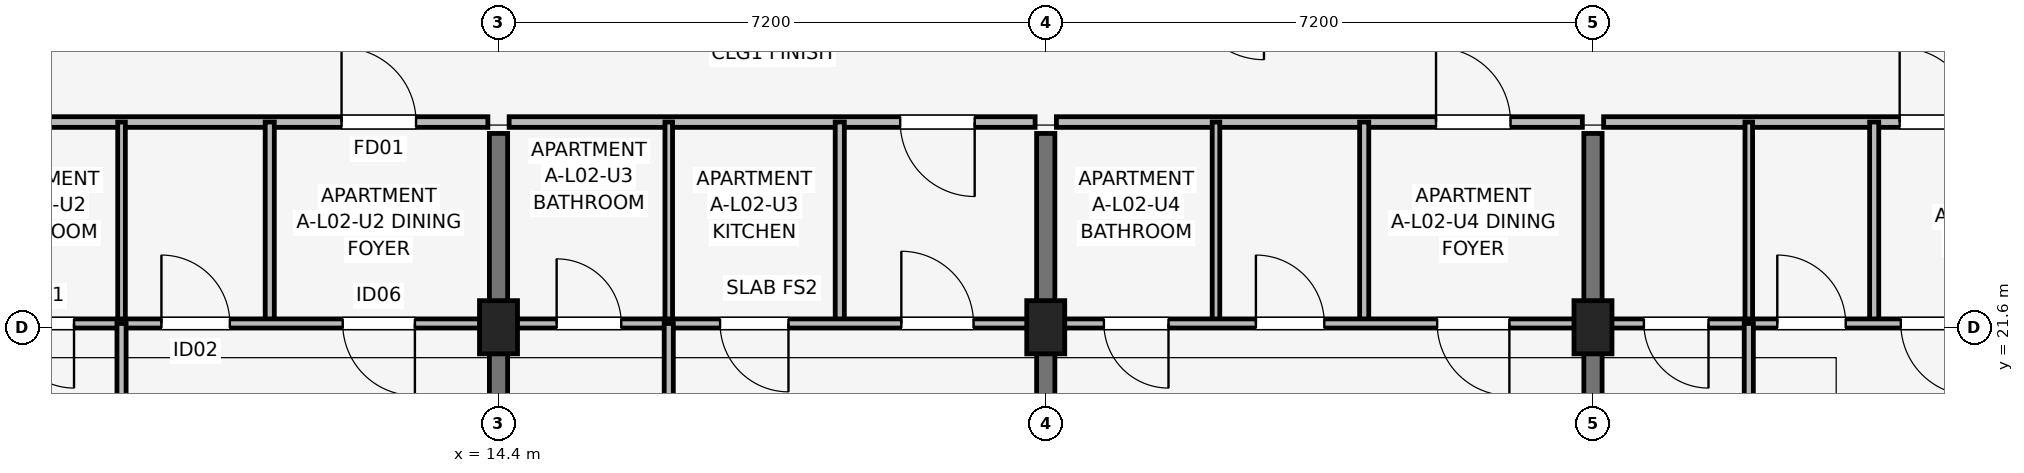
"""IFC4 building model, lengths in metres.
Left out: names, types, materials, properties, quantities, classifications, styles, units other than length and angle.
Written with IfcOpenShell. Run it as: python <this file> out.ifc"""

import sys

from ifc_helpers import new_model, si_unit, direction, frame, frame_2d, origin, origin_2d, place, context, subcontext, project, spatial, rectangle, extrude, element, fill, save


model = new_model("IFC4")
c1 = context("Model", 3, precision=1e-05, world=origin(), true_north=direction((0.0, 1.0)))
c2 = subcontext(c1, "Body", "Model", "MODEL_VIEW")
j1 = project(units=[si_unit("LENGTHUNIT", "METRE"), si_unit("PLANEANGLEUNIT", "RADIAN")], contexts=[c1])
p1 = place(None, origin())
s1 = spatial("IfcSite", under=j1, at=p1, CompositionType="ELEMENT")
p2 = place(p1, origin())
s2 = spatial("IfcBuilding", under=s1, at=p2, CompositionType="ELEMENT")
p3 = place(p2, frame((0.0, 0.0, 8.7)))
s3 = spatial("IfcBuildingStorey", under=s2, at=p3, CompositionType="ELEMENT", Elevation=8.7)
for number, where, z_axis, x_axis in (
    (1, (14.4, 21.6, 0.0), (0.0, 0.0, 1.0), (1.0, 0.0, 0.0)),
    (2, (21.6, 21.6, 0.0), (0.0, 0.0, 1.0), (1.0, 0.0, 0.0)),
    (3, (28.8, 21.6, 0.0), (0.0, 0.0, 1.0), (1.0, 0.0, 0.0)),
):
    element("IfcColumn", number, at=place(p3, frame(where, z_axis=z_axis, x_axis=x_axis)), inside=s3, PredefinedType="COLUMN", context=c2, shape_type="SweptSolid", body=[
        extrude(rectangle(XDim=0.5, YDim=0.7, at=origin_2d()), origin(), (0.0, 0.0, 1.0), 3.15),
    ])
for number, where, z_axis, x_axis in (
    (4, (14.4, 14.75, 0.0), (0.0, 0.0, 1.0), (0.0, 1.0, 0.0)),
    (5, (21.6, 14.75, 0.0), (0.0, 0.0, 1.0), (0.0, 1.0, 0.0)),
    (6, (28.8, 14.75, 0.0), (0.0, 0.0, 1.0), (0.0, 1.0, 0.0)),
):
    element("IfcWall", number, at=place(p3, frame(where, z_axis=z_axis, x_axis=x_axis)), inside=s3, PredefinedType="SHEAR", context=c2, shape_type="SweptSolid", body=[
        extrude(rectangle(XDim=9.4, YDim=0.24, at=frame_2d((4.7, 0.0))), origin(), (0.0, 0.0, 1.0), 3.15),
    ])
p4 = place(p3, frame((7.34, 24.3, 0.0), z_axis=(0.0, 0.0, 1.0), x_axis=(1.0, 0.0, 0.0)))
e7 = element("IfcWall", 7, at=p4, inside=s3, PredefinedType="PARTITIONING", context=c2, shape_type="SweptSolid", body=[
    extrude(rectangle(XDim=6.92, YDim=0.14, at=frame_2d((3.46, 0.0))), origin(), (0.0, 0.0, 1.0), 2.38),
])
p5 = place(p4, frame((4.995, 0.0, 0.0)))
e8 = element("IfcOpeningElement", 8, at=p5, cuts=e7, PredefinedType="OPENING", context=c2, shape_type="SweptSolid", body=[
    extrude(rectangle(XDim=0.98, YDim=2.1, at=frame_2d((0.49, 1.05))), frame((0.0, 0.08, 0.0), z_axis=(0.0, -1.0, 0.0), x_axis=(1.0, 0.0, 0.0)), (0.0, 0.0, 1.0), 0.16),
])
p6 = place(p3, frame((9.44, 21.65, 0.0), z_axis=(0.0, 0.0, 1.0), x_axis=(0.0, 1.0, 0.0)))
e9 = element("IfcWall", 9, at=p6, inside=s3, PredefinedType="PARTITIONING", context=c2, shape_type="SweptSolid", body=[
    extrude(rectangle(XDim=2.65, YDim=0.1, at=frame_2d((1.325, 0.0))), origin(), (0.0, 0.0, 1.0), 2.375),
])
p7 = place(p3, frame((11.39, 21.65, 0.0), z_axis=(0.0, 0.0, 1.0), x_axis=(0.0, 1.0, 0.0)))
e10 = element("IfcWall", 10, at=p7, inside=s3, PredefinedType="PARTITIONING", context=c2, shape_type="SweptSolid", body=[
    extrude(rectangle(XDim=2.65, YDim=0.12, at=frame_2d((1.325, 0.0))), origin(), (0.0, 0.0, 1.0), 2.375),
])
p8 = place(p3, frame((7.34, 21.65, 0.0), z_axis=(0.0, 0.0, 1.0), x_axis=(1.0, 0.0, 0.0)))
e11 = element("IfcWall", 11, at=p8, inside=s3, PredefinedType="PARTITIONING", context=c2, shape_type="SweptSolid", body=[
    extrude(rectangle(XDim=6.92, YDim=0.12, at=frame_2d((3.46, 0.0))), origin(), (0.0, 0.0, 1.0), 2.375),
])
p9 = place(p8, frame((1.475, 0.0, 0.0), z_axis=(0.0, 0.0, 1.0), x_axis=(-1.0, 0.0, 0.0)))
e12 = element("IfcOpeningElement", 12, at=p9, cuts=e11, PredefinedType="OPENING", context=c2, shape_type="SweptSolid", body=[
    extrude(rectangle(XDim=0.85, YDim=2.08, at=frame_2d((0.425, 1.04))), frame((0.0, 0.07, 0.0), z_axis=(0.0, -1.0, 0.0), x_axis=(1.0, 0.0, 0.0)), (0.0, 0.0, 1.0), 0.14),
])
p10 = place(p8, frame((2.625, 0.0, 0.0)))
e13 = element("IfcOpeningElement", 13, at=p10, cuts=e11, PredefinedType="OPENING", context=c2, shape_type="SweptSolid", body=[
    extrude(rectangle(XDim=0.9, YDim=2.08, at=frame_2d((0.45, 1.04))), frame((0.0, 0.07, 0.0), z_axis=(0.0, -1.0, 0.0), x_axis=(1.0, 0.0, 0.0)), (0.0, 0.0, 1.0), 0.14),
])
p11 = place(p8, frame((5.96, 0.0, 0.0), z_axis=(0.0, 0.0, 1.0), x_axis=(-1.0, 0.0, 0.0)))
e14 = element("IfcOpeningElement", 14, at=p11, cuts=e11, PredefinedType="OPENING", context=c2, shape_type="SweptSolid", body=[
    extrude(rectangle(XDim=0.95, YDim=2.08, at=frame_2d((0.475, 1.04))), frame((0.0, 0.07, 0.0), z_axis=(0.0, -1.0, 0.0), x_axis=(1.0, 0.0, 0.0)), (0.0, 0.0, 1.0), 0.14),
])
p12 = place(p3, frame((9.44, 14.7, 0.0), z_axis=(0.0, 0.0, 1.0), x_axis=(0.0, 1.0, 0.0)))
e15 = element("IfcWall", 15, at=p12, inside=s3, PredefinedType="PARTITIONING", context=c2, shape_type="SweptSolid", body=[
    extrude(rectangle(XDim=6.95, YDim=0.12, at=frame_2d((3.475, 0.0))), origin(), (0.0, 0.0, 1.0), 2.375),
])
p13 = place(p12, frame((3.025, 0.0, 0.0)))
e16 = element("IfcOpeningElement", 16, at=p13, cuts=e15, PredefinedType="OPENING", context=c2, shape_type="SweptSolid", body=[
    extrude(rectangle(XDim=0.9, YDim=2.08, at=frame_2d((0.45, 1.04))), frame((0.0, 0.07, 0.0), z_axis=(0.0, -1.0, 0.0), x_axis=(1.0, 0.0, 0.0)), (0.0, 0.0, 1.0), 0.14),
])
p14 = place(p3, frame((14.54, 24.3, 0.0), z_axis=(0.0, 0.0, 1.0), x_axis=(1.0, 0.0, 0.0)))
e17 = element("IfcWall", 17, at=p14, inside=s3, PredefinedType="PARTITIONING", context=c2, shape_type="SweptSolid", body=[
    extrude(rectangle(XDim=6.92, YDim=0.14, at=frame_2d((3.46, 0.0))), origin(), (0.0, 0.0, 1.0), 2.38),
])
p15 = place(p14, frame((6.125, 0.0, 0.0), z_axis=(0.0, 0.0, 1.0), x_axis=(-1.0, 0.0, 0.0)))
e18 = element("IfcOpeningElement", 18, at=p15, cuts=e17, PredefinedType="OPENING", context=c2, shape_type="SweptSolid", body=[
    extrude(rectangle(XDim=0.98, YDim=2.1, at=frame_2d((0.49, 1.05))), frame((0.0, 0.08, 0.0), z_axis=(0.0, -1.0, 0.0), x_axis=(1.0, 0.0, 0.0)), (0.0, 0.0, 1.0), 0.16),
])
p16 = place(p3, frame((16.64, 21.65, 0.0), z_axis=(0.0, 0.0, 1.0), x_axis=(0.0, 1.0, 0.0)))
e19 = element("IfcWall", 19, at=p16, inside=s3, PredefinedType="PARTITIONING", context=c2, shape_type="SweptSolid", body=[
    extrude(rectangle(XDim=2.65, YDim=0.1, at=frame_2d((1.325, 0.0))), origin(), (0.0, 0.0, 1.0), 2.375),
])
p17 = place(p3, frame((18.89, 21.65, 0.0), z_axis=(0.0, 0.0, 1.0), x_axis=(0.0, 1.0, 0.0)))
e20 = element("IfcWall", 20, at=p17, inside=s3, PredefinedType="PARTITIONING", context=c2, shape_type="SweptSolid", body=[
    extrude(rectangle(XDim=2.65, YDim=0.12, at=frame_2d((1.325, 0.0))), origin(), (0.0, 0.0, 1.0), 2.375),
])
p18 = place(p3, frame((14.54, 21.65, 0.0), z_axis=(0.0, 0.0, 1.0), x_axis=(1.0, 0.0, 0.0)))
e21 = element("IfcWall", 21, at=p18, inside=s3, PredefinedType="PARTITIONING", context=c2, shape_type="SweptSolid", body=[
    extrude(rectangle(XDim=6.92, YDim=0.12, at=frame_2d((3.46, 0.0))), origin(), (0.0, 0.0, 1.0), 2.375),
])
p19 = place(p18, frame((0.625, 0.0, 0.0)))
e22 = element("IfcOpeningElement", 22, at=p19, cuts=e21, PredefinedType="OPENING", context=c2, shape_type="SweptSolid", body=[
    extrude(rectangle(XDim=0.85, YDim=2.08, at=frame_2d((0.425, 1.04))), frame((0.0, 0.07, 0.0), z_axis=(0.0, -1.0, 0.0), x_axis=(1.0, 0.0, 0.0)), (0.0, 0.0, 1.0), 0.14),
])
p20 = place(p18, frame((3.675, 0.0, 0.0), z_axis=(0.0, 0.0, 1.0), x_axis=(-1.0, 0.0, 0.0)))
e23 = element("IfcOpeningElement", 23, at=p20, cuts=e21, PredefinedType="OPENING", context=c2, shape_type="SweptSolid", body=[
    extrude(rectangle(XDim=0.9, YDim=2.08, at=frame_2d((0.45, 1.04))), frame((0.0, 0.07, 0.0), z_axis=(0.0, -1.0, 0.0), x_axis=(1.0, 0.0, 0.0)), (0.0, 0.0, 1.0), 0.14),
])
p21 = place(p18, frame((5.16, 0.0, 0.0)))
e24 = element("IfcOpeningElement", 24, at=p21, cuts=e21, PredefinedType="OPENING", context=c2, shape_type="SweptSolid", body=[
    extrude(rectangle(XDim=0.95, YDim=2.08, at=frame_2d((0.475, 1.04))), frame((0.0, 0.07, 0.0), z_axis=(0.0, -1.0, 0.0), x_axis=(1.0, 0.0, 0.0)), (0.0, 0.0, 1.0), 0.14),
])
p22 = place(p3, frame((16.64, 14.7, 0.0), z_axis=(0.0, 0.0, 1.0), x_axis=(0.0, 1.0, 0.0)))
e25 = element("IfcWall", 25, at=p22, inside=s3, PredefinedType="PARTITIONING", context=c2, shape_type="SweptSolid", body=[
    extrude(rectangle(XDim=6.95, YDim=0.12, at=frame_2d((3.475, 0.0))), origin(), (0.0, 0.0, 1.0), 2.375),
])
p23 = place(p22, frame((3.925, 0.0, 0.0), z_axis=(0.0, 0.0, 1.0), x_axis=(-1.0, 0.0, 0.0)))
e26 = element("IfcOpeningElement", 26, at=p23, cuts=e25, PredefinedType="OPENING", context=c2, shape_type="SweptSolid", body=[
    extrude(rectangle(XDim=0.9, YDim=2.08, at=frame_2d((0.45, 1.04))), frame((0.0, 0.07, 0.0), z_axis=(0.0, -1.0, 0.0), x_axis=(1.0, 0.0, 0.0)), (0.0, 0.0, 1.0), 0.14),
])
p24 = place(p3, frame((21.74, 24.3, 0.0), z_axis=(0.0, 0.0, 1.0), x_axis=(1.0, 0.0, 0.0)))
e27 = element("IfcWall", 27, at=p24, inside=s3, PredefinedType="PARTITIONING", context=c2, shape_type="SweptSolid", body=[
    extrude(rectangle(XDim=6.92, YDim=0.14, at=frame_2d((3.46, 0.0))), origin(), (0.0, 0.0, 1.0), 2.38),
])
p25 = place(p24, frame((4.995, 0.0, 0.0)))
e28 = element("IfcOpeningElement", 28, at=p25, cuts=e27, PredefinedType="OPENING", context=c2, shape_type="SweptSolid", body=[
    extrude(rectangle(XDim=0.98, YDim=2.1, at=frame_2d((0.49, 1.05))), frame((0.0, 0.08, 0.0), z_axis=(0.0, -1.0, 0.0), x_axis=(1.0, 0.0, 0.0)), (0.0, 0.0, 1.0), 0.16),
])
p26 = place(p3, frame((23.84, 21.65, 0.0), z_axis=(0.0, 0.0, 1.0), x_axis=(0.0, 1.0, 0.0)))
e29 = element("IfcWall", 29, at=p26, inside=s3, PredefinedType="PARTITIONING", context=c2, shape_type="SweptSolid", body=[
    extrude(rectangle(XDim=2.65, YDim=0.1, at=frame_2d((1.325, 0.0))), origin(), (0.0, 0.0, 1.0), 2.375),
])
p27 = place(p3, frame((25.79, 21.65, 0.0), z_axis=(0.0, 0.0, 1.0), x_axis=(0.0, 1.0, 0.0)))
e30 = element("IfcWall", 30, at=p27, inside=s3, PredefinedType="PARTITIONING", context=c2, shape_type="SweptSolid", body=[
    extrude(rectangle(XDim=2.65, YDim=0.12, at=frame_2d((1.325, 0.0))), origin(), (0.0, 0.0, 1.0), 2.375),
])
p28 = place(p3, frame((21.74, 21.65, 0.0), z_axis=(0.0, 0.0, 1.0), x_axis=(1.0, 0.0, 0.0)))
e31 = element("IfcWall", 31, at=p28, inside=s3, PredefinedType="PARTITIONING", context=c2, shape_type="SweptSolid", body=[
    extrude(rectangle(XDim=6.92, YDim=0.12, at=frame_2d((3.46, 0.0))), origin(), (0.0, 0.0, 1.0), 2.375),
])
p29 = place(p28, frame((1.475, 0.0, 0.0), z_axis=(0.0, 0.0, 1.0), x_axis=(-1.0, 0.0, 0.0)))
e32 = element("IfcOpeningElement", 32, at=p29, cuts=e31, PredefinedType="OPENING", context=c2, shape_type="SweptSolid", body=[
    extrude(rectangle(XDim=0.85, YDim=2.08, at=frame_2d((0.425, 1.04))), frame((0.0, 0.07, 0.0), z_axis=(0.0, -1.0, 0.0), x_axis=(1.0, 0.0, 0.0)), (0.0, 0.0, 1.0), 0.14),
])
p30 = place(p28, frame((2.625, 0.0, 0.0)))
e33 = element("IfcOpeningElement", 33, at=p30, cuts=e31, PredefinedType="OPENING", context=c2, shape_type="SweptSolid", body=[
    extrude(rectangle(XDim=0.9, YDim=2.08, at=frame_2d((0.45, 1.04))), frame((0.0, 0.07, 0.0), z_axis=(0.0, -1.0, 0.0), x_axis=(1.0, 0.0, 0.0)), (0.0, 0.0, 1.0), 0.14),
])
p31 = place(p28, frame((5.96, 0.0, 0.0), z_axis=(0.0, 0.0, 1.0), x_axis=(-1.0, 0.0, 0.0)))
e34 = element("IfcOpeningElement", 34, at=p31, cuts=e31, PredefinedType="OPENING", context=c2, shape_type="SweptSolid", body=[
    extrude(rectangle(XDim=0.95, YDim=2.08, at=frame_2d((0.475, 1.04))), frame((0.0, 0.07, 0.0), z_axis=(0.0, -1.0, 0.0), x_axis=(1.0, 0.0, 0.0)), (0.0, 0.0, 1.0), 0.14),
])
p32 = place(p3, frame((28.94, 24.3, 0.0), z_axis=(0.0, 0.0, 1.0), x_axis=(1.0, 0.0, 0.0)))
e35 = element("IfcWall", 35, at=p32, inside=s3, PredefinedType="PARTITIONING", context=c2, shape_type="SweptSolid", body=[
    extrude(rectangle(XDim=6.92, YDim=0.14, at=frame_2d((3.46, 0.0))), origin(), (0.0, 0.0, 1.0), 2.38),
])
p33 = place(p32, frame((3.895, 0.0, 0.0)))
e36 = element("IfcOpeningElement", 36, at=p33, cuts=e35, PredefinedType="OPENING", context=c2, shape_type="SweptSolid", body=[
    extrude(rectangle(XDim=0.98, YDim=2.1, at=frame_2d((0.49, 1.05))), frame((0.0, 0.08, 0.0), z_axis=(0.0, -1.0, 0.0), x_axis=(1.0, 0.0, 0.0)), (0.0, 0.0, 1.0), 0.16),
])
p34 = place(p3, frame((30.85, 21.65, 0.0), z_axis=(0.0, 0.0, 1.0), x_axis=(0.0, 1.0, 0.0)))
e37 = element("IfcWall", 37, at=p34, inside=s3, PredefinedType="PARTITIONING", context=c2, shape_type="SweptSolid", body=[
    extrude(rectangle(XDim=2.65, YDim=0.1, at=frame_2d((1.325, 0.0))), origin(), (0.0, 0.0, 1.0), 2.375),
])
p35 = place(p3, frame((32.5, 21.65, 0.0), z_axis=(0.0, 0.0, 1.0), x_axis=(0.0, 1.0, 0.0)))
e38 = element("IfcWall", 38, at=p35, inside=s3, PredefinedType="PARTITIONING", context=c2, shape_type="SweptSolid", body=[
    extrude(rectangle(XDim=2.65, YDim=0.12, at=frame_2d((1.325, 0.0))), origin(), (0.0, 0.0, 1.0), 2.375),
])
p36 = place(p3, frame((28.94, 21.65, 0.0), z_axis=(0.0, 0.0, 1.0), x_axis=(1.0, 0.0, 0.0)))
e39 = element("IfcWall", 39, at=p36, inside=s3, PredefinedType="PARTITIONING", context=c2, shape_type="SweptSolid", body=[
    extrude(rectangle(XDim=6.92, YDim=0.12, at=frame_2d((3.46, 0.0))), origin(), (0.0, 0.0, 1.0), 2.375),
])
p37 = place(p36, frame((1.38, 0.0, 0.0), z_axis=(0.0, 0.0, 1.0), x_axis=(-1.0, 0.0, 0.0)))
e40 = element("IfcOpeningElement", 40, at=p37, cuts=e39, PredefinedType="OPENING", context=c2, shape_type="SweptSolid", body=[
    extrude(rectangle(XDim=0.85, YDim=2.08, at=frame_2d((0.425, 1.04))), frame((0.0, 0.07, 0.0), z_axis=(0.0, -1.0, 0.0), x_axis=(1.0, 0.0, 0.0)), (0.0, 0.0, 1.0), 0.14),
])
p38 = place(p36, frame((2.285, 0.0, 0.0)))
e41 = element("IfcOpeningElement", 41, at=p38, cuts=e39, PredefinedType="OPENING", context=c2, shape_type="SweptSolid", body=[
    extrude(rectangle(XDim=0.9, YDim=2.08, at=frame_2d((0.45, 1.04))), frame((0.0, 0.07, 0.0), z_axis=(0.0, -1.0, 0.0), x_axis=(1.0, 0.0, 0.0)), (0.0, 0.0, 1.0), 0.14),
])
p39 = place(p36, frame((4.86, 0.0, 0.0), z_axis=(0.0, 0.0, 1.0), x_axis=(-1.0, 0.0, 0.0)))
e42 = element("IfcOpeningElement", 42, at=p39, cuts=e39, PredefinedType="OPENING", context=c2, shape_type="SweptSolid", body=[
    extrude(rectangle(XDim=0.95, YDim=2.08, at=frame_2d((0.475, 1.04))), frame((0.0, 0.07, 0.0), z_axis=(0.0, -1.0, 0.0), x_axis=(1.0, 0.0, 0.0)), (0.0, 0.0, 1.0), 0.14),
])
p40 = place(p3, frame((30.85, 14.7, 0.0), z_axis=(0.0, 0.0, 1.0), x_axis=(0.0, 1.0, 0.0)))
e43 = element("IfcWall", 43, at=p40, inside=s3, PredefinedType="PARTITIONING", context=c2, shape_type="SweptSolid", body=[
    extrude(rectangle(XDim=6.95, YDim=0.12, at=frame_2d((3.475, 0.0))), origin(), (0.0, 0.0, 1.0), 2.375),
])
p41 = place(p40, frame((3.025, 0.0, 0.0)))
e44 = element("IfcOpeningElement", 44, at=p41, cuts=e43, PredefinedType="OPENING", context=c2, shape_type="SweptSolid", body=[
    extrude(rectangle(XDim=0.9, YDim=2.08, at=frame_2d((0.45, 1.04))), frame((0.0, 0.07, 0.0), z_axis=(0.0, -1.0, 0.0), x_axis=(1.0, 0.0, 0.0)), (0.0, 0.0, 1.0), 0.14),
])
p42 = place(p5, origin())
e45 = element("IfcDoor", 45, at=p42, inside=s3, OperationType="SINGLE_SWING_LEFT", PredefinedType="DOOR", context=c2, shape_type="SweptSolid", body=[
    extrude(rectangle(XDim=0.98, YDim=2.1, at=frame_2d((0.49, 1.05))), frame((0.0, 0.025, 0.0), z_axis=(0.0, -1.0, 0.0), x_axis=(1.0, 0.0, 0.0)), (0.0, 0.0, 1.0), 0.05),
])
fill(e8, e45)
p43 = place(p9, origin())
e46 = element("IfcDoor", 46, at=p43, inside=s3, OperationType="SINGLE_SWING_RIGHT", PredefinedType="DOOR", context=c2, shape_type="SweptSolid", body=[
    extrude(rectangle(XDim=0.85, YDim=2.08, at=frame_2d((0.425, 1.04))), frame((0.0, 0.025, 0.0), z_axis=(0.0, -1.0, 0.0), x_axis=(1.0, 0.0, 0.0)), (0.0, 0.0, 1.0), 0.05),
])
fill(e12, e46)
p44 = place(p10, origin())
e47 = element("IfcDoor", 47, at=p44, inside=s3, OperationType="SINGLE_SWING_LEFT", PredefinedType="DOOR", context=c2, shape_type="SweptSolid", body=[
    extrude(rectangle(XDim=0.9, YDim=2.08, at=frame_2d((0.45, 1.04))), frame((0.0, 0.025, 0.0), z_axis=(0.0, -1.0, 0.0), x_axis=(1.0, 0.0, 0.0)), (0.0, 0.0, 1.0), 0.05),
])
fill(e13, e47)
p45 = place(p11, origin())
e48 = element("IfcDoor", 48, at=p45, inside=s3, OperationType="SINGLE_SWING_RIGHT", PredefinedType="DOOR", context=c2, shape_type="SweptSolid", body=[
    extrude(rectangle(XDim=0.95, YDim=2.08, at=frame_2d((0.475, 1.04))), frame((0.0, 0.025, 0.0), z_axis=(0.0, -1.0, 0.0), x_axis=(1.0, 0.0, 0.0)), (0.0, 0.0, 1.0), 0.05),
])
fill(e14, e48)
p46 = place(p15, origin())
e49 = element("IfcDoor", 49, at=p46, inside=s3, OperationType="SINGLE_SWING_RIGHT", PredefinedType="DOOR", context=c2, shape_type="SweptSolid", body=[
    extrude(rectangle(XDim=0.98, YDim=2.1, at=frame_2d((0.49, 1.05))), frame((0.0, 0.025, 0.0), z_axis=(0.0, -1.0, 0.0), x_axis=(1.0, 0.0, 0.0)), (0.0, 0.0, 1.0), 0.05),
])
fill(e18, e49)
p47 = place(p19, origin())
e50 = element("IfcDoor", 50, at=p47, inside=s3, OperationType="SINGLE_SWING_LEFT", PredefinedType="DOOR", context=c2, shape_type="SweptSolid", body=[
    extrude(rectangle(XDim=0.85, YDim=2.08, at=frame_2d((0.425, 1.04))), frame((0.0, 0.025, 0.0), z_axis=(0.0, -1.0, 0.0), x_axis=(1.0, 0.0, 0.0)), (0.0, 0.0, 1.0), 0.05),
])
fill(e22, e50)
p48 = place(p20, origin())
e51 = element("IfcDoor", 51, at=p48, inside=s3, OperationType="SINGLE_SWING_RIGHT", PredefinedType="DOOR", context=c2, shape_type="SweptSolid", body=[
    extrude(rectangle(XDim=0.9, YDim=2.08, at=frame_2d((0.45, 1.04))), frame((0.0, 0.025, 0.0), z_axis=(0.0, -1.0, 0.0), x_axis=(1.0, 0.0, 0.0)), (0.0, 0.0, 1.0), 0.05),
])
fill(e23, e51)
p49 = place(p21, origin())
e52 = element("IfcDoor", 52, at=p49, inside=s3, OperationType="SINGLE_SWING_LEFT", PredefinedType="DOOR", context=c2, shape_type="SweptSolid", body=[
    extrude(rectangle(XDim=0.95, YDim=2.08, at=frame_2d((0.475, 1.04))), frame((0.0, 0.025, 0.0), z_axis=(0.0, -1.0, 0.0), x_axis=(1.0, 0.0, 0.0)), (0.0, 0.0, 1.0), 0.05),
])
fill(e24, e52)
p50 = place(p25, origin())
e53 = element("IfcDoor", 53, at=p50, inside=s3, OperationType="SINGLE_SWING_LEFT", PredefinedType="DOOR", context=c2, shape_type="SweptSolid", body=[
    extrude(rectangle(XDim=0.98, YDim=2.1, at=frame_2d((0.49, 1.05))), frame((0.0, 0.025, 0.0), z_axis=(0.0, -1.0, 0.0), x_axis=(1.0, 0.0, 0.0)), (0.0, 0.0, 1.0), 0.05),
])
fill(e28, e53)
p51 = place(p29, origin())
e54 = element("IfcDoor", 54, at=p51, inside=s3, OperationType="SINGLE_SWING_RIGHT", PredefinedType="DOOR", context=c2, shape_type="SweptSolid", body=[
    extrude(rectangle(XDim=0.85, YDim=2.08, at=frame_2d((0.425, 1.04))), frame((0.0, 0.025, 0.0), z_axis=(0.0, -1.0, 0.0), x_axis=(1.0, 0.0, 0.0)), (0.0, 0.0, 1.0), 0.05),
])
fill(e32, e54)
p52 = place(p30, origin())
e55 = element("IfcDoor", 55, at=p52, inside=s3, OperationType="SINGLE_SWING_LEFT", PredefinedType="DOOR", context=c2, shape_type="SweptSolid", body=[
    extrude(rectangle(XDim=0.9, YDim=2.08, at=frame_2d((0.45, 1.04))), frame((0.0, 0.025, 0.0), z_axis=(0.0, -1.0, 0.0), x_axis=(1.0, 0.0, 0.0)), (0.0, 0.0, 1.0), 0.05),
])
fill(e33, e55)
p53 = place(p31, origin())
e56 = element("IfcDoor", 56, at=p53, inside=s3, OperationType="SINGLE_SWING_RIGHT", PredefinedType="DOOR", context=c2, shape_type="SweptSolid", body=[
    extrude(rectangle(XDim=0.95, YDim=2.08, at=frame_2d((0.475, 1.04))), frame((0.0, 0.025, 0.0), z_axis=(0.0, -1.0, 0.0), x_axis=(1.0, 0.0, 0.0)), (0.0, 0.0, 1.0), 0.05),
])
fill(e34, e56)
p54 = place(p33, origin())
e57 = element("IfcDoor", 57, at=p54, inside=s3, OperationType="SINGLE_SWING_LEFT", PredefinedType="DOOR", context=c2, shape_type="SweptSolid", body=[
    extrude(rectangle(XDim=0.98, YDim=2.1, at=frame_2d((0.49, 1.05))), frame((0.0, 0.025, 0.0), z_axis=(0.0, -1.0, 0.0), x_axis=(1.0, 0.0, 0.0)), (0.0, 0.0, 1.0), 0.05),
])
fill(e36, e57)
p55 = place(p37, origin())
e58 = element("IfcDoor", 58, at=p55, inside=s3, OperationType="SINGLE_SWING_RIGHT", PredefinedType="DOOR", context=c2, shape_type="SweptSolid", body=[
    extrude(rectangle(XDim=0.85, YDim=2.08, at=frame_2d((0.425, 1.04))), frame((0.0, 0.025, 0.0), z_axis=(0.0, -1.0, 0.0), x_axis=(1.0, 0.0, 0.0)), (0.0, 0.0, 1.0), 0.05),
])
fill(e40, e58)
p56 = place(p38, origin())
e59 = element("IfcDoor", 59, at=p56, inside=s3, OperationType="SINGLE_SWING_LEFT", PredefinedType="DOOR", context=c2, shape_type="SweptSolid", body=[
    extrude(rectangle(XDim=0.9, YDim=2.08, at=frame_2d((0.45, 1.04))), frame((0.0, 0.025, 0.0), z_axis=(0.0, -1.0, 0.0), x_axis=(1.0, 0.0, 0.0)), (0.0, 0.0, 1.0), 0.05),
])
fill(e41, e59)
p57 = place(p39, origin())
e60 = element("IfcDoor", 60, at=p57, inside=s3, OperationType="SINGLE_SWING_RIGHT", PredefinedType="DOOR", context=c2, shape_type="SweptSolid", body=[
    extrude(rectangle(XDim=0.95, YDim=2.08, at=frame_2d((0.475, 1.04))), frame((0.0, 0.025, 0.0), z_axis=(0.0, -1.0, 0.0), x_axis=(1.0, 0.0, 0.0)), (0.0, 0.0, 1.0), 0.05),
])
fill(e42, e60)
save(model, sys.argv[1])
